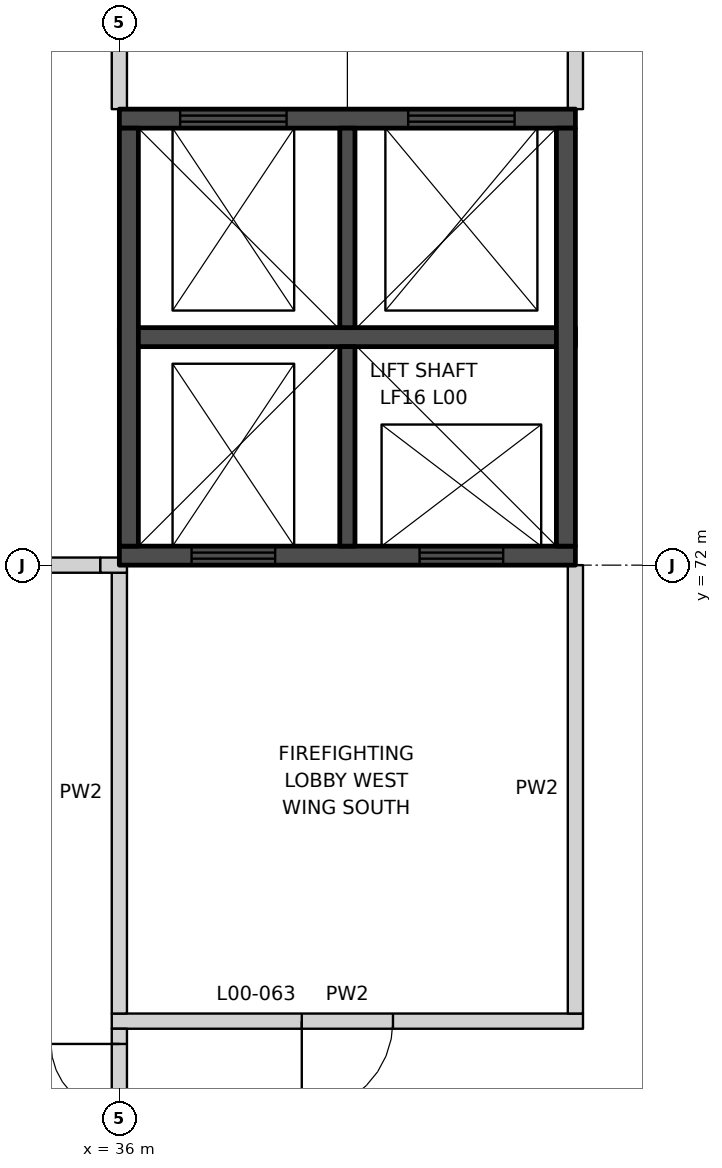
"""IFC4 building model, lengths in metres.
Left out: names, types, materials, properties, quantities, classifications, styles, units other than length and angle.
Written with IfcOpenShell. Run it as: python <this file> out.ifc"""

import sys

from ifc_helpers import new_model, si_unit, direction, frame, frame_2d, origin, place, context, subcontext, project, spatial, rectangle, extrude, element, fill, save


model = new_model("IFC4")
c1 = context("Model", 3, precision=1e-05, world=origin(), true_north=direction((0.0, 1.0)))
c2 = subcontext(c1, "Body", "Model", "MODEL_VIEW")
j1 = project(units=[si_unit("LENGTHUNIT", "METRE"), si_unit("PLANEANGLEUNIT", "RADIAN")], contexts=[c1])
p1 = place(None, origin())
s1 = spatial("IfcSite", under=j1, at=p1, CompositionType="ELEMENT")
p2 = place(p1, origin())
s2 = spatial("IfcBuilding", under=s1, at=p2, CompositionType="ELEMENT")
p3 = place(p2, origin())
s3 = spatial("IfcBuildingStorey", under=s2, at=p3, CompositionType="ELEMENT", Elevation=0.0)
p4 = place(p3, frame((35.9, 66.0, 0.0), z_axis=(0.0, 0.0, 1.0), x_axis=(1.0, 0.0, 0.0)))
e1 = element("IfcWall", 1, at=p4, inside=s3, PredefinedType="PARTITIONING", context=c2, shape_type="SweptSolid", body=[
    extrude(rectangle(XDim=6.2, YDim=0.2, at=frame_2d((3.1, 0.0))), origin(), (0.0, 0.0, 1.0), 7.0),
])
p5 = place(p4, frame((2.5, 0.0, 0.0)))
e2 = element("IfcOpeningElement", 2, at=p5, cuts=e1, PredefinedType="OPENING", context=c2, shape_type="SweptSolid", body=[
    extrude(rectangle(XDim=1.2, YDim=2.1, at=frame_2d((0.6, 1.05))), frame((0.0, 0.11, 0.0), z_axis=(0.0, -1.0, 0.0), x_axis=(1.0, 0.0, 0.0)), (0.0, 0.0, 1.0), 0.22),
])
p6 = place(p3, frame((27.45, 72.0, 0.0), z_axis=(0.0, 0.0, 1.0), x_axis=(1.0, 0.0, 0.0)))
e3 = element("IfcWall", 3, at=p6, inside=s3, PredefinedType="PARTITIONING", context=c2, shape_type="SweptSolid", body=[
    extrude(rectangle(XDim=8.3, YDim=0.2, at=frame_2d((4.15, 0.0))), origin(), (0.0, 0.0, 1.0), 5.75),
])
p7 = place(p3, frame((36.0, 63.45, 0.0), z_axis=(0.0, 0.0, 1.0), x_axis=(0.0, 1.0, 0.0)))
e4 = element("IfcWall", 4, at=p7, inside=s3, PredefinedType="PARTITIONING", context=c2, shape_type="SweptSolid", body=[
    extrude(rectangle(XDim=2.45, YDim=0.2, at=frame_2d((1.225, 0.0))), origin(), (0.0, 0.0, 1.0), 5.75),
])
p8 = place(p7, frame((0.45, 0.0, 0.0)))
e5 = element("IfcOpeningElement", 5, at=p8, cuts=e4, PredefinedType="OPENING", context=c2, shape_type="SweptSolid", body=[
    extrude(rectangle(XDim=1.8, YDim=2.1, at=frame_2d((0.9, 1.05))), frame((0.0, 0.11, 0.0), z_axis=(0.0, -1.0, 0.0), x_axis=(1.0, 0.0, 0.0)), (0.0, 0.0, 1.0), 0.22),
])
p9 = place(p3, frame((36.0, 66.1, 0.0), z_axis=(0.0, 0.0, 1.0), x_axis=(0.0, 1.0, 0.0)))
e6 = element("IfcWall", 6, at=p9, inside=s3, PredefinedType="PARTITIONING", context=c2, shape_type="SweptSolid", body=[
    extrude(rectangle(XDim=5.8, YDim=0.2, at=frame_2d((2.9, 0.0))), origin(), (0.0, 0.0, 1.0), 5.75),
])
p10 = place(p3, frame((36.0, 78.0, 0.0), z_axis=(0.0, 0.0, 1.0), x_axis=(0.0, 1.0, 0.0)))
e7 = element("IfcWall", 7, at=p10, inside=s3, PredefinedType="PARTITIONING", context=c2, shape_type="SweptSolid", body=[
    extrude(rectangle(XDim=2.55, YDim=0.2, at=frame_2d((1.275, 0.0))), origin(), (0.0, 0.0, 1.0), 5.95),
])
p11 = place(p3, frame((42.0, 66.1, 0.0), z_axis=(0.0, 0.0, 1.0), x_axis=(0.0, 1.0, 0.0)))
e8 = element("IfcWall", 8, at=p11, inside=s3, PredefinedType="PARTITIONING", context=c2, shape_type="SweptSolid", body=[
    extrude(rectangle(XDim=5.9, YDim=0.2, at=frame_2d((2.95, 0.0))), origin(), (0.0, 0.0, 1.0), 7.0),
])
p12 = place(p3, frame((42.0, 78.0, 0.0), z_axis=(0.0, 0.0, 1.0), x_axis=(0.0, 1.0, 0.0)))
e9 = element("IfcWall", 9, at=p12, inside=s3, PredefinedType="PARTITIONING", context=c2, shape_type="SweptSolid", body=[
    extrude(rectangle(XDim=3.0, YDim=0.2, at=frame_2d((1.5, 0.0))), origin(), (0.0, 0.0, 1.0), 7.0),
])
p13 = place(p3, frame((36.0, 72.125, 0.0), z_axis=(0.0, 0.0, 1.0), x_axis=(1.0, 0.0, 0.0)))
e10 = element("IfcWall", 10, at=p13, inside=s3, PredefinedType="SHEAR", context=c2, shape_type="SweptSolid", body=[
    extrude(rectangle(XDim=6.0, YDim=0.25, at=frame_2d((3.0, 0.0))), origin(), (0.0, 0.0, 1.0), 7.0),
])
p14 = place(p13, frame((0.95, 0.0, 0.0)))
e11 = element("IfcOpeningElement", 11, at=p14, cuts=e10, PredefinedType="OPENING", context=c2, shape_type="SweptSolid", body=[
    extrude(rectangle(XDim=1.1, YDim=2.1, at=frame_2d((0.55, 1.05))), frame((0.0, 0.135, 0.0), z_axis=(0.0, -1.0, 0.0), x_axis=(1.0, 0.0, 0.0)), (0.0, 0.0, 1.0), 0.27),
])
p15 = place(p13, frame((3.95, 0.0, 0.0)))
e12 = element("IfcOpeningElement", 12, at=p15, cuts=e10, PredefinedType="OPENING", context=c2, shape_type="SweptSolid", body=[
    extrude(rectangle(XDim=1.1, YDim=2.1, at=frame_2d((0.55, 1.05))), frame((0.0, 0.135, 0.0), z_axis=(0.0, -1.0, 0.0), x_axis=(1.0, 0.0, 0.0)), (0.0, 0.0, 1.0), 0.27),
])
p16 = place(p3, frame((36.0, 77.875, 0.0), z_axis=(0.0, 0.0, 1.0), x_axis=(1.0, 0.0, 0.0)))
e13 = element("IfcWall", 13, at=p16, inside=s3, PredefinedType="SHEAR", context=c2, shape_type="SweptSolid", body=[
    extrude(rectangle(XDim=6.0, YDim=0.25, at=frame_2d((3.0, 0.0))), origin(), (0.0, 0.0, 1.0), 7.0),
])
p17 = place(p16, frame((0.8, 0.0, 0.0)))
e14 = element("IfcOpeningElement", 14, at=p17, cuts=e13, PredefinedType="OPENING", context=c2, shape_type="SweptSolid", body=[
    extrude(rectangle(XDim=1.4, YDim=2.1, at=frame_2d((0.7, 1.05))), frame((0.0, 0.135, 0.0), z_axis=(0.0, -1.0, 0.0), x_axis=(1.0, 0.0, 0.0)), (0.0, 0.0, 1.0), 0.27),
])
p18 = place(p16, frame((3.8, 0.0, 0.0)))
e15 = element("IfcOpeningElement", 15, at=p18, cuts=e13, PredefinedType="OPENING", context=c2, shape_type="SweptSolid", body=[
    extrude(rectangle(XDim=1.4, YDim=2.1, at=frame_2d((0.7, 1.05))), frame((0.0, 0.135, 0.0), z_axis=(0.0, -1.0, 0.0), x_axis=(1.0, 0.0, 0.0)), (0.0, 0.0, 1.0), 0.27),
])
p19 = place(p3, frame((36.0, 75.0, 0.0), z_axis=(0.0, 0.0, 1.0), x_axis=(1.0, 0.0, 0.0)))
e16 = element("IfcWall", 16, at=p19, inside=s3, PredefinedType="SHEAR", context=c2, shape_type="SweptSolid", body=[
    extrude(rectangle(XDim=6.0, YDim=0.25, at=frame_2d((3.0, 0.0))), origin(), (0.0, 0.0, 1.0), 7.0),
])
for number, where, z_axis, x_axis in (
    (17, (36.125, 72.25, 0.0), (0.0, 0.0, 1.0), (0.0, 1.0, 0.0)),
    (18, (41.875, 72.25, 0.0), (0.0, 0.0, 1.0), (0.0, 1.0, 0.0)),
):
    element("IfcWall", number, at=place(p3, frame(where, z_axis=z_axis, x_axis=x_axis)), inside=s3, PredefinedType="SHEAR", context=c2, shape_type="SweptSolid", body=[
        extrude(rectangle(XDim=5.5, YDim=0.25, at=frame_2d((2.75, 0.0))), origin(), (0.0, 0.0, 1.0), 7.0),
    ])
for number, where, z_axis, x_axis in (
    (19, (39.0, 72.25, 0.0), (0.0, 0.0, 1.0), (0.0, 1.0, 0.0)),
    (20, (39.0, 75.125, 0.0), (0.0, 0.0, 1.0), (0.0, 1.0, 0.0)),
):
    element("IfcWall", number, at=place(p3, frame(where, z_axis=z_axis, x_axis=x_axis)), inside=s3, PredefinedType="SHEAR", context=c2, shape_type="SweptSolid", body=[
        extrude(rectangle(XDim=2.625, YDim=0.2, at=frame_2d((1.312, 0.0))), origin(), (0.0, 0.0, 1.0), 7.0),
    ])
p20 = place(p3, frame((35.75, 72.0, 0.0), z_axis=(0.0, 0.0, 1.0), x_axis=(1.0, 0.0, 0.0)))
e21 = element("IfcWall", 21, at=p20, inside=s3, PredefinedType="PARTITIONING", context=c2, shape_type="SweptSolid", body=[
    extrude(rectangle(XDim=0.35, YDim=0.2, at=frame_2d((0.175, 0.0))), origin(), (0.0, 0.0, 1.0), 7.0),
])
p21 = place(p8, origin())
e22 = element("IfcDoor", 22, at=p21, inside=s3, OperationType="DOUBLE_DOOR_DOUBLE_SWING", PredefinedType="DOOR", context=c2, shape_type="SweptSolid", body=[
    extrude(rectangle(XDim=1.8, YDim=2.1, at=frame_2d((0.9, 1.05))), frame((0.0, 0.025, 0.0), z_axis=(0.0, -1.0, 0.0), x_axis=(1.0, 0.0, 0.0)), (0.0, 0.0, 1.0), 0.05),
])
fill(e5, e22)
p22 = place(p5, frame((1.2, 0.0, 0.0), z_axis=(0.0, 0.0, 1.0), x_axis=(-1.0, 0.0, 0.0)))
e23 = element("IfcDoor", 23, at=p22, inside=s3, OperationType="SINGLE_SWING_RIGHT", PredefinedType="DOOR", context=c2, shape_type="SweptSolid", body=[
    extrude(rectangle(XDim=1.2, YDim=2.1, at=frame_2d((0.6, 1.05))), frame((0.0, 0.025, 0.0), z_axis=(0.0, -1.0, 0.0), x_axis=(1.0, 0.0, 0.0)), (0.0, 0.0, 1.0), 0.05),
])
fill(e2, e23)
p23 = place(p14, origin())
e24 = element("IfcDoor", 24, at=p23, inside=s3, OperationType="DOUBLE_DOOR_SLIDING", PredefinedType="DOOR", context=c2, shape_type="SweptSolid", body=[
    extrude(rectangle(XDim=1.1, YDim=2.1, at=frame_2d((0.55, 1.05))), frame((0.0, 0.025, 0.0), z_axis=(0.0, -1.0, 0.0), x_axis=(1.0, 0.0, 0.0)), (0.0, 0.0, 1.0), 0.05),
])
fill(e11, e24)
p24 = place(p15, origin())
e25 = element("IfcDoor", 25, at=p24, inside=s3, OperationType="DOUBLE_DOOR_SLIDING", PredefinedType="DOOR", context=c2, shape_type="SweptSolid", body=[
    extrude(rectangle(XDim=1.1, YDim=2.1, at=frame_2d((0.55, 1.05))), frame((0.0, 0.025, 0.0), z_axis=(0.0, -1.0, 0.0), x_axis=(1.0, 0.0, 0.0)), (0.0, 0.0, 1.0), 0.05),
])
fill(e12, e25)
p25 = place(p17, origin())
e26 = element("IfcDoor", 26, at=p25, inside=s3, OperationType="DOUBLE_DOOR_SLIDING", PredefinedType="DOOR", context=c2, shape_type="SweptSolid", body=[
    extrude(rectangle(XDim=1.4, YDim=2.1, at=frame_2d((0.7, 1.05))), frame((0.0, 0.025, 0.0), z_axis=(0.0, -1.0, 0.0), x_axis=(1.0, 0.0, 0.0)), (0.0, 0.0, 1.0), 0.05),
])
fill(e14, e26)
p26 = place(p18, origin())
e27 = element("IfcDoor", 27, at=p26, inside=s3, OperationType="DOUBLE_DOOR_SLIDING", PredefinedType="DOOR", context=c2, shape_type="SweptSolid", body=[
    extrude(rectangle(XDim=1.4, YDim=2.1, at=frame_2d((0.7, 1.05))), frame((0.0, 0.025, 0.0), z_axis=(0.0, -1.0, 0.0), x_axis=(1.0, 0.0, 0.0)), (0.0, 0.0, 1.0), 0.05),
])
fill(e15, e27)
save(model, sys.argv[1])
